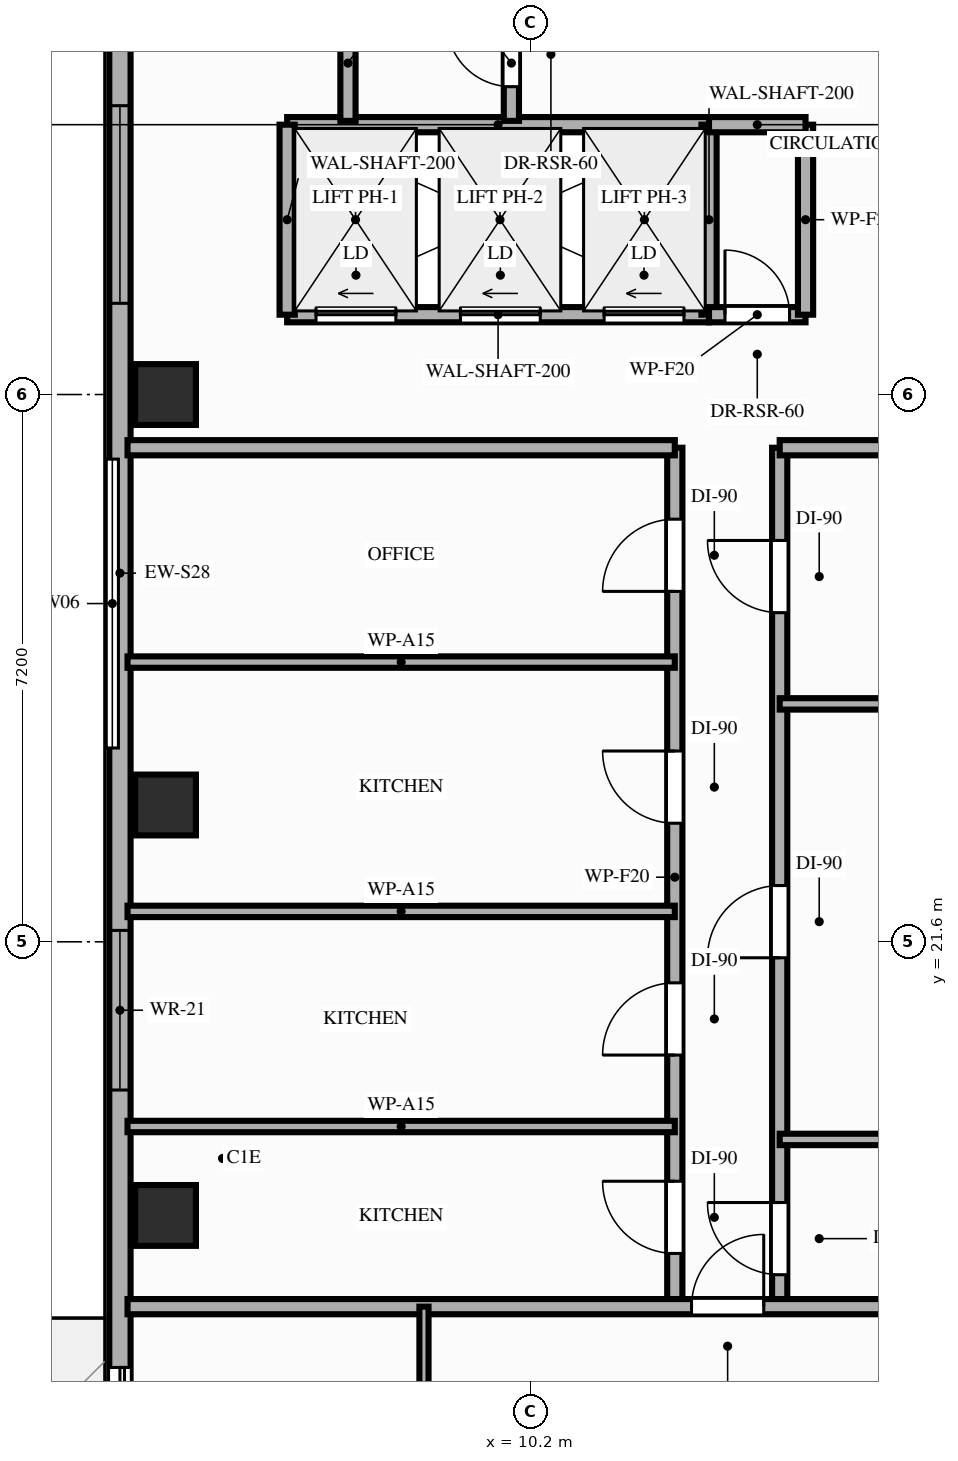
"""IFC4 building model, lengths in metres.
Left out: names, types, materials, properties, quantities, classifications, styles, units other than length and angle.
Written with IfcOpenShell. Run it as: python <this file> out.ifc"""

import sys

from ifc_helpers import new_model, si_unit, direction, frame, frame_2d, origin, origin_2d, place, context, subcontext, project, spatial, rectangle, extrude, element, fill, save


model = new_model("IFC4")
c1 = context("Model", 3, precision=1e-05, world=origin(), true_north=direction((0.0, 1.0)))
c2 = subcontext(c1, "Body", "Model", "MODEL_VIEW")
j1 = project(units=[si_unit("LENGTHUNIT", "METRE"), si_unit("PLANEANGLEUNIT", "RADIAN")], contexts=[c1])
p1 = place(None, origin())
s1 = spatial("IfcSite", under=j1, at=p1, CompositionType="ELEMENT")
p2 = place(p1, origin())
s2 = spatial("IfcBuilding", under=s1, at=p2, CompositionType="ELEMENT")
p3 = place(p2, frame((0.0, 0.0, 237.6)))
s3 = spatial("IfcBuildingStorey", under=s2, at=p3, CompositionType="ELEMENT", Elevation=237.6)
for number, where, z_axis, x_axis in (
    (1, (5.4, 18.0, 0.0), (0.0, 0.0, 1.0), (1.0, 0.0, 0.0)),
    (2, (5.4, 23.4, 0.0), (0.0, 0.0, 1.0), (1.0, 0.0, 0.0)),
    (3, (5.4, 28.8, 0.0), (0.0, 0.0, 1.0), (1.0, 0.0, 0.0)),
):
    element("IfcColumn", number, at=place(p3, frame(where, z_axis=z_axis, x_axis=x_axis)), inside=s3, PredefinedType="COLUMN", context=c2, shape_type="SweptSolid", body=[
        extrude(rectangle(XDim=0.8, YDim=0.8, at=origin_2d()), origin(), (0.0, 0.0, 1.0), 3.2),
    ])
p4 = place(p3, frame((4.8, 42.1, 0.0), z_axis=(0.0, 0.0, 1.0), x_axis=(0.0, -1.0, 0.0)))
e4 = element("IfcWall", 4, at=p4, inside=s3, PredefinedType="STANDARD", context=c2, shape_type="SweptSolid", body=[
    extrude(rectangle(XDim=31.3, YDim=0.28, at=frame_2d((15.65, 0.0))), origin(), (0.0, 0.0, 1.0), 2.71),
])
p5 = place(p4, frame((26.1, 0.0, 0.0)))
e5 = element("IfcOpeningElement", 5, at=p5, cuts=e4, PredefinedType="OPENING", context=c2, shape_type="SweptSolid", body=[
    extrude(rectangle(XDim=1.4, YDim=2.1, at=frame_2d((0.7, 1.05))), frame((0.0, 0.15, 0.0), z_axis=(0.0, -1.0, 0.0), x_axis=(1.0, 0.0, 0.0)), (0.0, 0.0, 1.0), 0.3),
])
p6 = place(p4, frame((20.35, 0.0, 0.85)))
e6 = element("IfcOpeningElement", 6, at=p6, cuts=e4, PredefinedType="OPENING", context=c2, shape_type="SweptSolid", body=[
    extrude(rectangle(XDim=2.1, YDim=1.61, at=frame_2d((1.05, 0.805))), frame((0.0, 0.15, 0.0), z_axis=(0.0, -1.0, 0.0), x_axis=(1.0, 0.0, 0.0)), (0.0, 0.0, 1.0), 0.3),
])
p7 = place(p4, frame((9.5, 0.0, 0.85)))
e7 = element("IfcOpeningElement", 7, at=p7, cuts=e4, PredefinedType="OPENING", context=c2, shape_type="SweptSolid", body=[
    extrude(rectangle(XDim=2.6, YDim=1.61, at=frame_2d((1.3, 0.805))), frame((0.0, 0.15, 0.0), z_axis=(0.0, -1.0, 0.0), x_axis=(1.0, 0.0, 0.0)), (0.0, 0.0, 1.0), 0.3),
])
p8 = place(p4, frame((3.4, 0.0, 0.85)))
e8 = element("IfcOpeningElement", 8, at=p8, cuts=e4, PredefinedType="OPENING", context=c2, shape_type="SweptSolid", body=[
    extrude(rectangle(XDim=2.6, YDim=1.61, at=frame_2d((1.3, 0.805))), frame((0.0, 0.15, 0.0), z_axis=(0.0, -1.0, 0.0), x_axis=(1.0, 0.0, 0.0)), (0.0, 0.0, 1.0), 0.3),
])
p9 = place(p3, frame((7.0, 29.85, 0.0), z_axis=(0.0, 0.0, 1.0), x_axis=(1.0, 0.0, 0.0)))
e9 = element("IfcWall", 9, at=p9, inside=s3, PredefinedType="MOVABLE", context=c2, shape_type="SweptSolid", body=[
    extrude(rectangle(XDim=5.55, YDim=0.2, at=frame_2d((2.775, 0.0))), origin(), (0.0, 0.0, 1.0), 3.02),
])
p10 = place(p9, frame((0.38, 0.0, 0.0)))
e10 = element("IfcOpeningElement", 10, at=p10, cuts=e9, PredefinedType="OPENING", context=c2, shape_type="SweptSolid", body=[
    extrude(rectangle(XDim=1.05, YDim=2.15, at=frame_2d((0.525, 1.075))), frame((0.0, 0.11, 0.0), z_axis=(0.0, -1.0, 0.0), x_axis=(1.0, 0.0, 0.0)), (0.0, 0.0, 1.0), 0.22),
])
p11 = place(p9, frame((2.28, 0.0, 0.0)))
e11 = element("IfcOpeningElement", 11, at=p11, cuts=e9, PredefinedType="OPENING", context=c2, shape_type="SweptSolid", body=[
    extrude(rectangle(XDim=1.05, YDim=2.15, at=frame_2d((0.525, 1.075))), frame((0.0, 0.11, 0.0), z_axis=(0.0, -1.0, 0.0), x_axis=(1.0, 0.0, 0.0)), (0.0, 0.0, 1.0), 0.22),
])
p12 = place(p9, frame((4.17, 0.0, 0.0)))
e12 = element("IfcOpeningElement", 12, at=p12, cuts=e9, PredefinedType="OPENING", context=c2, shape_type="SweptSolid", body=[
    extrude(rectangle(XDim=1.05, YDim=2.15, at=frame_2d((0.525, 1.075))), frame((0.0, 0.11, 0.0), z_axis=(0.0, -1.0, 0.0), x_axis=(1.0, 0.0, 0.0)), (0.0, 0.0, 1.0), 0.22),
])
p13 = place(p3, frame((7.0, 32.35, 0.0), z_axis=(0.0, 0.0, 1.0), x_axis=(1.0, 0.0, 0.0)))
e13 = element("IfcWall", 13, at=p13, inside=s3, PredefinedType="MOVABLE", context=c2, shape_type="SweptSolid", body=[
    extrude(rectangle(XDim=5.55, YDim=0.2, at=frame_2d((2.775, 0.0))), origin(), (0.0, 0.0, 1.0), 3.02),
])
for number, where, z_axis, x_axis in (
    (14, (7.0, 29.85, 0.0), (0.0, 0.0, 1.0), (0.0, 1.0, 0.0)),
    (15, (12.55, 29.85, 0.0), (0.0, 0.0, 1.0), (0.0, 1.0, 0.0)),
):
    element("IfcWall", number, at=place(p3, frame(where, z_axis=z_axis, x_axis=x_axis)), inside=s3, PredefinedType="MOVABLE", context=c2, shape_type="SweptSolid", body=[
        extrude(rectangle(XDim=2.5, YDim=0.2, at=frame_2d((1.25, 0.0))), origin(), (0.0, 0.0, 1.0), 3.02),
    ])
p14 = place(p3, frame((12.55, 29.85, 0.0), z_axis=(0.0, 0.0, 1.0), x_axis=(1.0, 0.0, 0.0)))
e16 = element("IfcWall", 16, at=p14, inside=s3, PredefinedType="PARTITIONING", context=c2, shape_type="SweptSolid", body=[
    extrude(rectangle(XDim=1.27, YDim=0.2, at=frame_2d((0.635, 0.0))), origin(), (0.0, 0.0, 1.0), 3.02),
])
p15 = place(p14, frame((0.21, 0.0, 0.0)))
e17 = element("IfcOpeningElement", 17, at=p15, cuts=e16, PredefinedType="OPENING", context=c2, shape_type="SweptSolid", body=[
    extrude(rectangle(XDim=0.85, YDim=2.05, at=frame_2d((0.425, 1.025))), frame((0.0, 0.11, 0.0), z_axis=(0.0, -1.0, 0.0), x_axis=(1.0, 0.0, 0.0)), (0.0, 0.0, 1.0), 0.22),
])
p16 = place(p3, frame((13.82, 29.85, 0.0), z_axis=(0.0, 0.0, 1.0), x_axis=(0.0, 1.0, 0.0)))
e18 = element("IfcWall", 18, at=p16, inside=s3, PredefinedType="PARTITIONING", context=c2, shape_type="SweptSolid", body=[
    extrude(rectangle(XDim=2.5, YDim=0.2, at=frame_2d((1.25, 0.0))), origin(), (0.0, 0.0, 1.0), 3.02),
])
p17 = place(p3, frame((12.55, 32.35, 0.0), z_axis=(0.0, 0.0, 1.0), x_axis=(1.0, 0.0, 0.0)))
e19 = element("IfcWall", 19, at=p17, inside=s3, PredefinedType="PARTITIONING", context=c2, shape_type="SweptSolid", body=[
    extrude(rectangle(XDim=1.27, YDim=0.2, at=frame_2d((0.635, 0.0))), origin(), (0.0, 0.0, 1.0), 3.02),
])
p18 = place(p3, frame((7.8, 32.4, 0.0), z_axis=(0.0, 0.0, 1.0), x_axis=(0.0, 1.0, 0.0)))
e20 = element("IfcWall", 20, at=p18, inside=s3, PredefinedType="PARTITIONING", context=c2, shape_type="SweptSolid", body=[
    extrude(rectangle(XDim=1.52, YDim=0.2, at=frame_2d((0.76, 0.0))), origin(), (0.0, 0.0, 1.0), 2.56),
])
p19 = place(p3, frame((9.95, 32.4, 0.0), z_axis=(0.0, 0.0, 1.0), x_axis=(0.0, 1.0, 0.0)))
e21 = element("IfcWall", 21, at=p19, inside=s3, PredefinedType="PARTITIONING", context=c2, shape_type="SweptSolid", body=[
    extrude(rectangle(XDim=1.52, YDim=0.2, at=frame_2d((0.76, 0.0))), origin(), (0.0, 0.0, 1.0), 2.56),
])
p20 = place(p19, frame((0.45, 0.0, 0.0)))
e22 = element("IfcOpeningElement", 22, at=p20, cuts=e21, PredefinedType="OPENING", context=c2, shape_type="SweptSolid", body=[
    extrude(rectangle(XDim=0.85, YDim=2.05, at=frame_2d((0.425, 1.025))), frame((0.0, 0.11, 0.0), z_axis=(0.0, -1.0, 0.0), x_axis=(1.0, 0.0, 0.0)), (0.0, 0.0, 1.0), 0.22),
])
p21 = place(p3, frame((12.1, 16.8, 0.0), z_axis=(0.0, 0.0, 1.0), x_axis=(0.0, 1.0, 0.0)))
e23 = element("IfcWall", 23, at=p21, inside=s3, PredefinedType="PARTITIONING", context=c2, shape_type="SweptSolid", body=[
    extrude(rectangle(XDim=11.3, YDim=0.2, at=frame_2d((5.65, 0.0))), origin(), (0.0, 0.0, 1.0), 2.56),
])
p22 = place(p21, frame((0.7, 0.0, 0.0)))
e24 = element("IfcOpeningElement", 24, at=p22, cuts=e23, PredefinedType="OPENING", context=c2, shape_type="SweptSolid", body=[
    extrude(rectangle(XDim=0.95, YDim=2.15, at=frame_2d((0.475, 1.075))), frame((0.0, 0.11, 0.0), z_axis=(0.0, -1.0, 0.0), x_axis=(1.0, 0.0, 0.0)), (0.0, 0.0, 1.0), 0.22),
])
p23 = place(p21, frame((3.31, 0.0, 0.0)))
e25 = element("IfcOpeningElement", 25, at=p23, cuts=e23, PredefinedType="OPENING", context=c2, shape_type="SweptSolid", body=[
    extrude(rectangle(XDim=0.95, YDim=2.15, at=frame_2d((0.475, 1.075))), frame((0.0, 0.11, 0.0), z_axis=(0.0, -1.0, 0.0), x_axis=(1.0, 0.0, 0.0)), (0.0, 0.0, 1.0), 0.22),
])
p24 = place(p21, frame((6.36, 0.0, 0.0)))
e26 = element("IfcOpeningElement", 26, at=p24, cuts=e23, PredefinedType="OPENING", context=c2, shape_type="SweptSolid", body=[
    extrude(rectangle(XDim=0.95, YDim=2.15, at=frame_2d((0.475, 1.075))), frame((0.0, 0.11, 0.0), z_axis=(0.0, -1.0, 0.0), x_axis=(1.0, 0.0, 0.0)), (0.0, 0.0, 1.0), 0.22),
])
p25 = place(p21, frame((9.41, 0.0, 0.0)))
e27 = element("IfcOpeningElement", 27, at=p25, cuts=e23, PredefinedType="OPENING", context=c2, shape_type="SweptSolid", body=[
    extrude(rectangle(XDim=0.95, YDim=2.15, at=frame_2d((0.475, 1.075))), frame((0.0, 0.11, 0.0), z_axis=(0.0, -1.0, 0.0), x_axis=(1.0, 0.0, 0.0)), (0.0, 0.0, 1.0), 0.22),
])
p26 = place(p3, frame((13.48, 16.8, 0.0), z_axis=(0.0, 0.0, 1.0), x_axis=(0.0, 1.0, 0.0)))
e28 = element("IfcWall", 28, at=p26, inside=s3, PredefinedType="PARTITIONING", context=c2, shape_type="SweptSolid", body=[
    extrude(rectangle(XDim=11.3, YDim=0.2, at=frame_2d((5.65, 0.0))), origin(), (0.0, 0.0, 1.0), 2.56),
])
p27 = place(p26, frame((0.42, 0.0, 0.0)))
e29 = element("IfcOpeningElement", 29, at=p27, cuts=e28, PredefinedType="OPENING", context=c2, shape_type="SweptSolid", body=[
    extrude(rectangle(XDim=0.95, YDim=2.1, at=frame_2d((0.475, 1.05))), frame((0.0, 0.11, 0.0), z_axis=(0.0, -1.0, 0.0), x_axis=(1.0, 0.0, 0.0)), (0.0, 0.0, 1.0), 0.22),
])
p28 = place(p26, frame((4.59, 0.0, 0.0)))
e30 = element("IfcOpeningElement", 30, at=p28, cuts=e28, PredefinedType="OPENING", context=c2, shape_type="SweptSolid", body=[
    extrude(rectangle(XDim=0.95, YDim=2.15, at=frame_2d((0.475, 1.075))), frame((0.0, 0.11, 0.0), z_axis=(0.0, -1.0, 0.0), x_axis=(1.0, 0.0, 0.0)), (0.0, 0.0, 1.0), 0.22),
])
p29 = place(p26, frame((9.13, 0.0, 0.0)))
e31 = element("IfcOpeningElement", 31, at=p29, cuts=e28, PredefinedType="OPENING", context=c2, shape_type="SweptSolid", body=[
    extrude(rectangle(XDim=0.95, YDim=2.15, at=frame_2d((0.475, 1.075))), frame((0.0, 0.11, 0.0), z_axis=(0.0, -1.0, 0.0), x_axis=(1.0, 0.0, 0.0)), (0.0, 0.0, 1.0), 0.22),
])
p30 = place(p3, frame((4.9, 16.8, 0.0), z_axis=(0.0, 0.0, 1.0), x_axis=(1.0, 0.0, 0.0)))
e32 = element("IfcWall", 32, at=p30, inside=s3, PredefinedType="PARTITIONING", context=c2, shape_type="SweptSolid", body=[
    extrude(rectangle(XDim=15.0, YDim=0.2, at=frame_2d((7.5, 0.0))), origin(), (0.0, 0.0, 1.0), 2.56),
])
p31 = place(p30, frame((7.42, 0.0, 0.0)))
e33 = element("IfcOpeningElement", 33, at=p31, cuts=e32, PredefinedType="OPENING", context=c2, shape_type="SweptSolid", body=[
    extrude(rectangle(XDim=0.95, YDim=2.15, at=frame_2d((0.475, 1.075))), frame((0.0, 0.11, 0.0), z_axis=(0.0, -1.0, 0.0), x_axis=(1.0, 0.0, 0.0)), (0.0, 0.0, 1.0), 0.22),
])
p32 = place(p3, frame((4.9, 28.1, 0.0), z_axis=(0.0, 0.0, 1.0), x_axis=(1.0, 0.0, 0.0)))
e34 = element("IfcWall", 34, at=p32, inside=s3, PredefinedType="PARTITIONING", context=c2, shape_type="SweptSolid", body=[
    extrude(rectangle(XDim=7.2, YDim=0.2, at=frame_2d((3.6, 0.0))), origin(), (0.0, 0.0, 1.0), 2.56),
])
p33 = place(p3, frame((13.48, 28.1, 0.0), z_axis=(0.0, 0.0, 1.0), x_axis=(1.0, 0.0, 0.0)))
e35 = element("IfcWall", 35, at=p33, inside=s3, PredefinedType="PARTITIONING", context=c2, shape_type="SweptSolid", body=[
    extrude(rectangle(XDim=6.42, YDim=0.2, at=frame_2d((3.21, 0.0))), origin(), (0.0, 0.0, 1.0), 2.56),
])
p34 = place(p3, frame((8.8, 10.7, 0.0), z_axis=(0.0, 0.0, 1.0), x_axis=(0.0, 1.0, 0.0)))
e36 = element("IfcWall", 36, at=p34, inside=s3, PredefinedType="PARTITIONING", context=c2, shape_type="SweptSolid", body=[
    extrude(rectangle(XDim=6.1, YDim=0.12, at=frame_2d((3.05, 0.0))), origin(), (0.0, 0.0, 1.0), 2.56),
])
p35 = place(p34, frame((2.75, 0.0, 0.0)))
e37 = element("IfcOpeningElement", 37, at=p35, cuts=e36, PredefinedType="OPENING", context=c2, shape_type="SweptSolid", body=[
    extrude(rectangle(XDim=0.95, YDim=2.15, at=frame_2d((0.475, 1.075))), frame((0.0, 0.07, 0.0), z_axis=(0.0, -1.0, 0.0), x_axis=(1.0, 0.0, 0.0)), (0.0, 0.0, 1.0), 0.14),
])
for number, where, z_axis, x_axis in (
    (38, (4.9, 19.17, 0.0), (0.0, 0.0, 1.0), (1.0, 0.0, 0.0)),
    (39, (4.9, 22.0, 0.0), (0.0, 0.0, 1.0), (1.0, 0.0, 0.0)),
    (40, (4.9, 25.28, 0.0), (0.0, 0.0, 1.0), (1.0, 0.0, 0.0)),
):
    element("IfcWall", number, at=place(p3, frame(where, z_axis=z_axis, x_axis=x_axis)), inside=s3, PredefinedType="PARTITIONING", context=c2, shape_type="SweptSolid", body=[
        extrude(rectangle(XDim=7.2, YDim=0.15, at=frame_2d((3.6, 0.0))), origin(), (0.0, 0.0, 1.0), 2.56),
    ])
for number, where, z_axis, x_axis in (
    (41, (13.48, 19.0, 0.0), (0.0, 0.0, 1.0), (1.0, 0.0, 0.0)),
    (42, (13.48, 24.73, 0.0), (0.0, 0.0, 1.0), (1.0, 0.0, 0.0)),
):
    element("IfcWall", number, at=place(p3, frame(where, z_axis=z_axis, x_axis=x_axis)), inside=s3, PredefinedType="PARTITIONING", context=c2, shape_type="SweptSolid", body=[
        extrude(rectangle(XDim=6.42, YDim=0.15, at=frame_2d((3.21, 0.0))), origin(), (0.0, 0.0, 1.0), 2.56),
    ])
p36 = place(p5, origin())
e43 = element("IfcDoor", 43, at=p36, inside=s3, OperationType="SLIDING_TO_RIGHT", PredefinedType="DOOR", context=c2, shape_type="SweptSolid", body=[
    extrude(rectangle(XDim=1.4, YDim=2.1, at=frame_2d((0.7, 1.05))), frame((0.0, 0.025, 0.0), z_axis=(0.0, -1.0, 0.0), x_axis=(1.0, 0.0, 0.0)), (0.0, 0.0, 1.0), 0.05),
])
fill(e5, e43)
p37 = place(p6, origin())
e44 = element("IfcWindow", 44, at=p37, inside=s3, PartitioningType="SINGLE_PANEL", PredefinedType="WINDOW", context=c2, shape_type="SweptSolid", body=[
    extrude(rectangle(XDim=2.1, YDim=1.61, at=frame_2d((1.05, 0.805))), frame((0.0, 0.03, 0.0), z_axis=(0.0, -1.0, 0.0), x_axis=(1.0, 0.0, 0.0)), (0.0, 0.0, 1.0), 0.06),
])
fill(e6, e44)
p38 = place(p7, origin())
e45 = element("IfcWindow", 45, at=p38, inside=s3, PartitioningType="SINGLE_PANEL", PredefinedType="WINDOW", context=c2, shape_type="SweptSolid", body=[
    extrude(rectangle(XDim=2.6, YDim=1.61, at=frame_2d((1.3, 0.805))), frame((0.0, 0.03, 0.0), z_axis=(0.0, -1.0, 0.0), x_axis=(1.0, 0.0, 0.0)), (0.0, 0.0, 1.0), 0.06),
])
fill(e7, e45)
p39 = place(p10, origin())
e46 = element("IfcDoor", 46, at=p39, inside=s3, OperationType="SLIDING_TO_LEFT", PredefinedType="DOOR", context=c2, shape_type="SweptSolid", body=[
    extrude(rectangle(XDim=1.05, YDim=2.15, at=frame_2d((0.525, 1.075))), frame((0.0, 0.025, 0.0), z_axis=(0.0, -1.0, 0.0), x_axis=(1.0, 0.0, 0.0)), (0.0, 0.0, 1.0), 0.05),
])
fill(e10, e46)
p40 = place(p11, origin())
e47 = element("IfcDoor", 47, at=p40, inside=s3, OperationType="SLIDING_TO_LEFT", PredefinedType="DOOR", context=c2, shape_type="SweptSolid", body=[
    extrude(rectangle(XDim=1.05, YDim=2.15, at=frame_2d((0.525, 1.075))), frame((0.0, 0.025, 0.0), z_axis=(0.0, -1.0, 0.0), x_axis=(1.0, 0.0, 0.0)), (0.0, 0.0, 1.0), 0.05),
])
fill(e11, e47)
p41 = place(p12, origin())
e48 = element("IfcDoor", 48, at=p41, inside=s3, OperationType="SLIDING_TO_LEFT", PredefinedType="DOOR", context=c2, shape_type="SweptSolid", body=[
    extrude(rectangle(XDim=1.05, YDim=2.15, at=frame_2d((0.525, 1.075))), frame((0.0, 0.025, 0.0), z_axis=(0.0, -1.0, 0.0), x_axis=(1.0, 0.0, 0.0)), (0.0, 0.0, 1.0), 0.05),
])
fill(e12, e48)
p42 = place(p15, origin())
e49 = element("IfcDoor", 49, at=p42, inside=s3, OperationType="SINGLE_SWING_LEFT", PredefinedType="DOOR", context=c2, shape_type="SweptSolid", body=[
    extrude(rectangle(XDim=0.85, YDim=2.05, at=frame_2d((0.425, 1.025))), frame((0.0, 0.025, 0.0), z_axis=(0.0, -1.0, 0.0), x_axis=(1.0, 0.0, 0.0)), (0.0, 0.0, 1.0), 0.05),
])
fill(e17, e49)
p43 = place(p20, origin())
e50 = element("IfcDoor", 50, at=p43, inside=s3, OperationType="SINGLE_SWING_RIGHT", PredefinedType="DOOR", context=c2, shape_type="SweptSolid", body=[
    extrude(rectangle(XDim=0.85, YDim=2.05, at=frame_2d((0.425, 1.025))), frame((0.0, 0.025, 0.0), z_axis=(0.0, -1.0, 0.0), x_axis=(1.0, 0.0, 0.0)), (0.0, 0.0, 1.0), 0.05),
])
fill(e22, e50)
p44 = place(p31, origin())
e51 = element("IfcDoor", 51, at=p44, inside=s3, OperationType="SINGLE_SWING_RIGHT", PredefinedType="DOOR", context=c2, shape_type="SweptSolid", body=[
    extrude(rectangle(XDim=0.95, YDim=2.15, at=frame_2d((0.475, 1.075))), frame((0.0, 0.025, 0.0), z_axis=(0.0, -1.0, 0.0), x_axis=(1.0, 0.0, 0.0)), (0.0, 0.0, 1.0), 0.05),
])
fill(e33, e51)
p45 = place(p22, origin())
e52 = element("IfcDoor", 52, at=p45, inside=s3, OperationType="SINGLE_SWING_RIGHT", PredefinedType="DOOR", context=c2, shape_type="SweptSolid", body=[
    extrude(rectangle(XDim=0.95, YDim=2.15, at=frame_2d((0.475, 1.075))), frame((0.0, 0.025, 0.0), z_axis=(0.0, -1.0, 0.0), x_axis=(1.0, 0.0, 0.0)), (0.0, 0.0, 1.0), 0.05),
])
fill(e24, e52)
p46 = place(p23, origin())
e53 = element("IfcDoor", 53, at=p46, inside=s3, OperationType="SINGLE_SWING_LEFT", PredefinedType="DOOR", context=c2, shape_type="SweptSolid", body=[
    extrude(rectangle(XDim=0.95, YDim=2.15, at=frame_2d((0.475, 1.075))), frame((0.0, 0.025, 0.0), z_axis=(0.0, -1.0, 0.0), x_axis=(1.0, 0.0, 0.0)), (0.0, 0.0, 1.0), 0.05),
])
fill(e25, e53)
p47 = place(p24, origin())
e54 = element("IfcDoor", 54, at=p47, inside=s3, OperationType="SINGLE_SWING_RIGHT", PredefinedType="DOOR", context=c2, shape_type="SweptSolid", body=[
    extrude(rectangle(XDim=0.95, YDim=2.15, at=frame_2d((0.475, 1.075))), frame((0.0, 0.025, 0.0), z_axis=(0.0, -1.0, 0.0), x_axis=(1.0, 0.0, 0.0)), (0.0, 0.0, 1.0), 0.05),
])
fill(e26, e54)
p48 = place(p25, origin())
e55 = element("IfcDoor", 55, at=p48, inside=s3, OperationType="SINGLE_SWING_LEFT", PredefinedType="DOOR", context=c2, shape_type="SweptSolid", body=[
    extrude(rectangle(XDim=0.95, YDim=2.15, at=frame_2d((0.475, 1.075))), frame((0.0, 0.025, 0.0), z_axis=(0.0, -1.0, 0.0), x_axis=(1.0, 0.0, 0.0)), (0.0, 0.0, 1.0), 0.05),
])
fill(e27, e55)
p49 = place(p27, origin())
e56 = element("IfcDoor", 56, at=p49, inside=s3, OperationType="SINGLE_SWING_RIGHT", PredefinedType="DOOR", context=c2, shape_type="SweptSolid", body=[
    extrude(rectangle(XDim=0.95, YDim=2.1, at=frame_2d((0.475, 1.05))), frame((0.0, 0.025, 0.0), z_axis=(0.0, -1.0, 0.0), x_axis=(1.0, 0.0, 0.0)), (0.0, 0.0, 1.0), 0.05),
])
fill(e29, e56)
p50 = place(p28, origin())
e57 = element("IfcDoor", 57, at=p50, inside=s3, OperationType="SINGLE_SWING_LEFT", PredefinedType="DOOR", context=c2, shape_type="SweptSolid", body=[
    extrude(rectangle(XDim=0.95, YDim=2.15, at=frame_2d((0.475, 1.075))), frame((0.0, 0.025, 0.0), z_axis=(0.0, -1.0, 0.0), x_axis=(1.0, 0.0, 0.0)), (0.0, 0.0, 1.0), 0.05),
])
fill(e30, e57)
p51 = place(p29, origin())
e58 = element("IfcDoor", 58, at=p51, inside=s3, OperationType="SINGLE_SWING_RIGHT", PredefinedType="DOOR", context=c2, shape_type="SweptSolid", body=[
    extrude(rectangle(XDim=0.95, YDim=2.15, at=frame_2d((0.475, 1.075))), frame((0.0, 0.025, 0.0), z_axis=(0.0, -1.0, 0.0), x_axis=(1.0, 0.0, 0.0)), (0.0, 0.0, 1.0), 0.05),
])
fill(e31, e58)
save(model, sys.argv[1])
